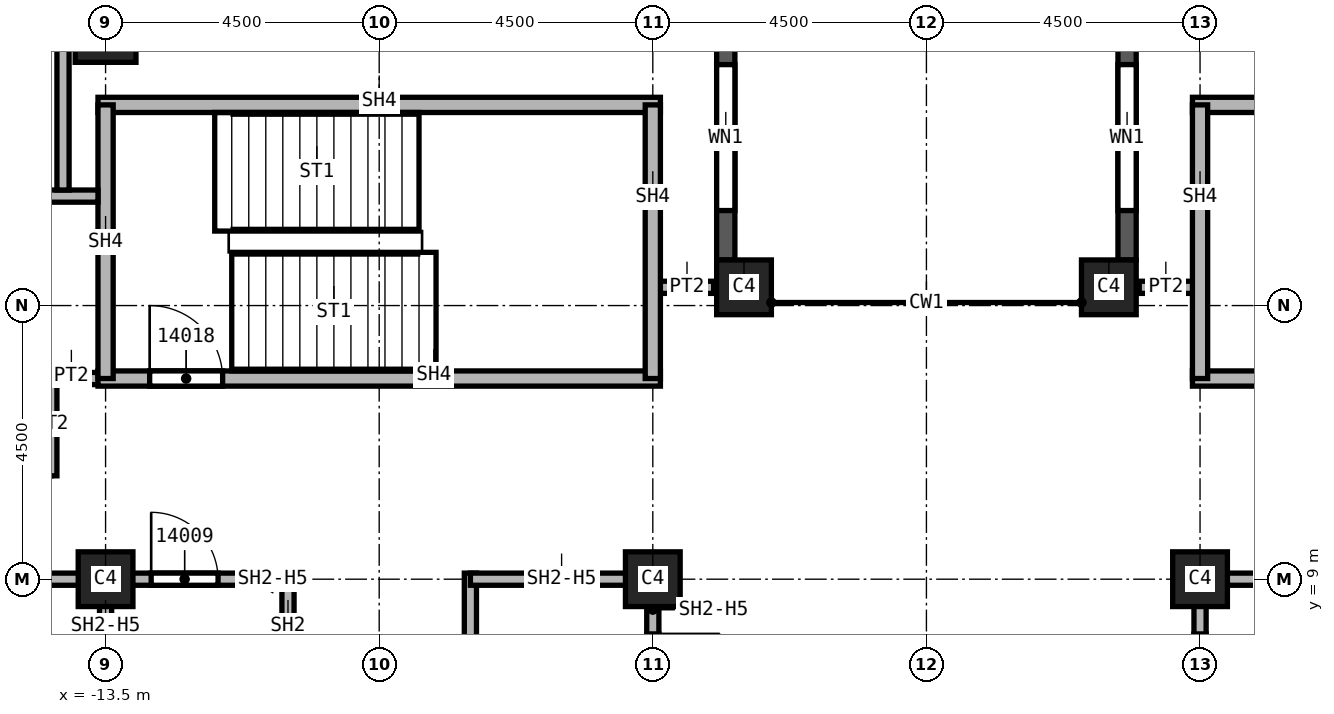
"""IFC4 building model, lengths in metres.
Left out: names, types, materials, properties, quantities, classifications, styles, units other than length and angle.
Written with IfcOpenShell. Run it as: python <this file> out.ifc"""

import sys

from ifc_helpers import new_model, si_unit, direction, frame, frame_2d, origin, origin_2d, place, context, subcontext, project, spatial, rectangle, extrude, element, fill, save


model = new_model("IFC4")
c1 = context("Model", 3, precision=1e-05, world=origin(), true_north=direction((0.0, 1.0)))
c2 = subcontext(c1, "Body", "Model", "MODEL_VIEW")
j1 = project(units=[si_unit("LENGTHUNIT", "METRE"), si_unit("PLANEANGLEUNIT", "RADIAN")], contexts=[c1])
p1 = place(None, origin())
s1 = spatial("IfcSite", under=j1, at=p1, CompositionType="ELEMENT")
p2 = place(p1, origin())
s2 = spatial("IfcBuilding", under=s1, at=p2, CompositionType="ELEMENT")
p3 = place(p2, frame((0.0, 0.0, 224.0)))
s3 = spatial("IfcBuildingStorey", under=s2, at=p3, CompositionType="ELEMENT", Elevation=224.0)
p4 = place(p3, frame((-13.5, 18.0, 0.0), z_axis=(0.0, 0.0, 1.0), x_axis=(1.0, 0.0, 0.0)))
e1 = element("IfcColumn", 1, at=p4, inside=s3, PredefinedType="COLUMN", context=c2, shape_type="SweptSolid", body=[
    extrude(rectangle(XDim=1.0, YDim=1.0, at=origin_2d()), origin(), (0.0, 0.0, 1.0), 3.72),
])
for number, where, z_axis, x_axis in (
    (2, (4.5, 9.0, 0.0), (0.0, 0.0, 1.0), (1.0, 0.0, 0.0)),
    (3, (-4.5, 9.0, 0.0), (0.0, 0.0, 1.0), (1.0, 0.0, 0.0)),
    (4, (-13.5, 9.0, 0.0), (0.0, 0.0, 1.0), (1.0, 0.0, 0.0)),
    (5, (3.0, 13.8, 0.0), (0.0, 0.0, 1.0), (1.0, 0.0, 0.0)),
    (6, (-3.0, 13.8, 0.0), (0.0, 0.0, 1.0), (1.0, 0.0, 0.0)),
):
    element("IfcColumn", number, at=place(p3, frame(where, z_axis=z_axis, x_axis=x_axis)), inside=s3, PredefinedType="COLUMN", context=c2, shape_type="SweptSolid", body=[
        extrude(rectangle(XDim=0.9, YDim=0.9, at=origin_2d()), origin(), (0.0, 0.0, 1.0), 3.72),
    ])
p5 = place(p3, frame((3.3, 22.3, 0.0), z_axis=(0.0, 0.0, 1.0), x_axis=(0.0, -1.0, 0.0)))
e7 = element("IfcWall", 7, at=p5, inside=s3, PredefinedType="SOLIDWALL", context=c2, shape_type="SweptSolid", body=[
    extrude(rectangle(XDim=8.05, YDim=0.3, at=frame_2d((4.025, 0.0))), origin(), (0.0, 0.0, 1.0), 3.12),
])
p6 = place(p5, frame((0.812, 0.0, 0.8)))
e8 = element("IfcOpeningElement", 8, at=p6, cuts=e7, PredefinedType="OPENING", context=c2, shape_type="SweptSolid", body=[
    extrude(rectangle(XDim=2.4, YDim=1.95, at=frame_2d((1.2, 0.975))), frame((0.0, 0.15, 0.0), z_axis=(0.0, -1.0, 0.0), x_axis=(1.0, 0.0, 0.0)), (0.0, 0.0, 1.0), 0.3),
])
p7 = place(p5, frame((4.837, 0.0, 0.8)))
e9 = element("IfcOpeningElement", 9, at=p7, cuts=e7, PredefinedType="OPENING", context=c2, shape_type="SweptSolid", body=[
    extrude(rectangle(XDim=2.4, YDim=1.95, at=frame_2d((1.2, 0.975))), frame((0.0, 0.15, 0.0), z_axis=(0.0, -1.0, 0.0), x_axis=(1.0, 0.0, 0.0)), (0.0, 0.0, 1.0), 0.3),
])
p8 = place(p3, frame((-3.3, 14.25, 0.0), z_axis=(0.0, 0.0, 1.0), x_axis=(0.0, 1.0, 0.0)))
e10 = element("IfcWall", 10, at=p8, inside=s3, PredefinedType="SOLIDWALL", context=c2, shape_type="SweptSolid", body=[
    extrude(rectangle(XDim=8.05, YDim=0.3, at=frame_2d((4.025, 0.0))), origin(), (0.0, 0.0, 1.0), 3.12),
])
p9 = place(p8, frame((0.812, 0.0, 0.8)))
e11 = element("IfcOpeningElement", 11, at=p9, cuts=e10, PredefinedType="OPENING", context=c2, shape_type="SweptSolid", body=[
    extrude(rectangle(XDim=2.4, YDim=1.95, at=frame_2d((1.2, 0.975))), frame((0.0, 0.15, 0.0), z_axis=(0.0, -1.0, 0.0), x_axis=(1.0, 0.0, 0.0)), (0.0, 0.0, 1.0), 0.3),
])
p10 = place(p8, frame((4.837, 0.0, 0.8)))
e12 = element("IfcOpeningElement", 12, at=p10, cuts=e10, PredefinedType="OPENING", context=c2, shape_type="SweptSolid", body=[
    extrude(rectangle(XDim=2.4, YDim=1.95, at=frame_2d((1.2, 0.975))), frame((0.0, 0.15, 0.0), z_axis=(0.0, -1.0, 0.0), x_axis=(1.0, 0.0, 0.0)), (0.0, 0.0, 1.0), 0.3),
])
p11 = place(p3, frame((-14.5, 12.3, 0.0), z_axis=(0.0, 0.0, 1.0), x_axis=(1.0, 0.0, 0.0)))
e13 = element("IfcWall", 13, at=p11, inside=s3, PredefinedType="PARTITIONING", context=c2, shape_type="SweptSolid", body=[
    extrude(rectangle(XDim=1.125, YDim=0.2, at=frame_2d((0.562, 0.0))), origin(), (0.0, 0.0, 1.0), 3.72),
])
p12 = place(p3, frame((-13.5, 9.0, 0.0), z_axis=(0.0, 0.0, 1.0), x_axis=(-1.0, 0.0, 0.0)))
e14 = element("IfcWall", 14, at=p12, inside=s3, PredefinedType="PARTITIONING", context=c2, shape_type="SweptSolid", body=[
    extrude(rectangle(XDim=4.5, YDim=0.2, at=frame_2d((2.25, 0.0))), origin(), (0.0, 0.0, 1.0), 3.72),
])
p13 = place(p3, frame((-14.4, 10.7, 0.0), z_axis=(0.0, 0.0, 1.0), x_axis=(0.0, 1.0, 0.0)))
e15 = element("IfcWall", 15, at=p13, inside=s3, PredefinedType="PARTITIONING", context=c2, shape_type="SweptSolid", body=[
    extrude(rectangle(XDim=1.6, YDim=0.2, at=frame_2d((0.8, 0.0))), origin(), (0.0, 0.0, 1.0), 3.72),
])
for number, where, z_axis, x_axis in (
    (16, (-4.5, 13.8, 0.0), (0.0, 0.0, 1.0), (1.0, 0.0, 0.0)),
    (17, (3.5, 13.8, 0.0), (0.0, 0.0, 1.0), (1.0, 0.0, 0.0)),
):
    element("IfcWall", number, at=place(p3, frame(where, z_axis=z_axis, x_axis=x_axis)), inside=s3, PredefinedType="PARTITIONING", context=c2, shape_type="SweptSolid", body=[
        extrude(rectangle(XDim=1.0, YDim=0.2, at=frame_2d((0.5, 0.0))), origin(), (0.0, 0.0, 1.0), 3.72),
    ])
p14 = place(p3, frame((-13.6, 9.0, 0.0), z_axis=(0.0, 0.0, 1.0), x_axis=(1.0, 0.0, 0.0)))
e18 = element("IfcWall", 18, at=p14, inside=s3, PredefinedType="SOLIDWALL", context=c2, shape_type="SweptSolid", body=[
    extrude(rectangle(XDim=3.1, YDim=0.2, at=frame_2d((1.55, 0.0))), origin(), (0.0, 0.0, 1.0), 2.958),
])
p15 = place(p14, frame((0.85, 0.0, 0.0)))
e19 = element("IfcOpeningElement", 19, at=p15, cuts=e18, PredefinedType="OPENING", context=c2, shape_type="SweptSolid", body=[
    extrude(rectangle(XDim=1.1, YDim=2.1, at=frame_2d((0.55, 1.05))), frame((0.0, 0.1, 0.0), z_axis=(0.0, -1.0, 0.0), x_axis=(1.0, 0.0, 0.0)), (0.0, 0.0, 1.0), 0.2),
])
p16 = place(p3, frame((-13.5, 7.5, 0.0), z_axis=(0.0, 0.0, 1.0), x_axis=(0.0, 1.0, 0.0)))
e20 = element("IfcWall", 20, at=p16, inside=s3, PredefinedType="SOLIDWALL", context=c2, shape_type="SweptSolid", body=[
    extrude(rectangle(XDim=1.6, YDim=0.2, at=frame_2d((0.8, 0.0))), origin(), (0.0, 0.0, 1.0), 2.958),
])
p17 = place(p3, frame((-10.5, 7.425, 0.0), z_axis=(0.0, 0.0, 1.0), x_axis=(0.0, 1.0, 0.0)))
e21 = element("IfcWall", 21, at=p17, inside=s3, PredefinedType="SOLIDWALL", context=c2, shape_type="SweptSolid", body=[
    extrude(rectangle(XDim=1.675, YDim=0.2, at=frame_2d((0.837, 0.0))), origin(), (0.0, 0.0, 1.0), 3.72),
])
p18 = place(p3, frame((-7.5, 6.0, 0.0), z_axis=(0.0, 0.0, 1.0), x_axis=(0.0, 1.0, 0.0)))
e22 = element("IfcWall", 22, at=p18, inside=s3, PredefinedType="SOLIDWALL", context=c2, shape_type="SweptSolid", body=[
    extrude(rectangle(XDim=3.1, YDim=0.2, at=frame_2d((1.55, 0.0))), origin(), (0.0, 0.0, 1.0), 3.72),
])
p19 = place(p3, frame((-7.5, 9.0, 0.0), z_axis=(0.0, 0.0, 1.0), x_axis=(1.0, 0.0, 0.0)))
e23 = element("IfcWall", 23, at=p19, inside=s3, PredefinedType="SOLIDWALL", context=c2, shape_type="SweptSolid", body=[
    extrude(rectangle(XDim=3.0, YDim=0.2, at=frame_2d((1.5, 0.0))), origin(), (0.0, 0.0, 1.0), 2.958),
])
p20 = place(p3, frame((-4.5, 9.1, 0.0), z_axis=(0.0, 0.0, 1.0), x_axis=(0.0, -1.0, 0.0)))
e24 = element("IfcWall", 24, at=p20, inside=s3, PredefinedType="SOLIDWALL", context=c2, shape_type="SweptSolid", body=[
    extrude(rectangle(XDim=3.1, YDim=0.2, at=frame_2d((1.55, 0.0))), origin(), (0.0, 0.0, 1.0), 2.958),
])
p21 = place(p20, frame((1.0, 0.0, 0.0)))
e25 = element("IfcOpeningElement", 25, at=p21, cuts=e24, PredefinedType="OPENING", context=c2, shape_type="SweptSolid", body=[
    extrude(rectangle(XDim=1.1, YDim=2.1, at=frame_2d((0.55, 1.05))), frame((0.0, 0.1, 0.0), z_axis=(0.0, -1.0, 0.0), x_axis=(1.0, 0.0, 0.0)), (0.0, 0.0, 1.0), 0.2),
])
p22 = place(p3, frame((4.5, 0.0, 0.0), z_axis=(0.0, 0.0, 1.0), x_axis=(0.0, 1.0, 0.0)))
e26 = element("IfcWall", 26, at=p22, inside=s3, PredefinedType="SOLIDWALL", context=c2, shape_type="SweptSolid", body=[
    extrude(rectangle(XDim=9.1, YDim=0.2, at=frame_2d((4.55, 0.0))), origin(), (0.0, 0.0, 1.0), 2.958),
])
p23 = place(p22, frame((3.4, 0.0, 0.0)))
e27 = element("IfcOpeningElement", 27, at=p23, cuts=e26, PredefinedType="OPENING", context=c2, shape_type="SweptSolid", body=[
    extrude(rectangle(XDim=1.1, YDim=2.1, at=frame_2d((0.55, 1.05))), frame((0.0, 0.1, 0.0), z_axis=(0.0, -1.0, 0.0), x_axis=(1.0, 0.0, 0.0)), (0.0, 0.0, 1.0), 0.2),
])
p24 = place(p22, frame((7.0, 0.0, 0.0)))
e28 = element("IfcOpeningElement", 28, at=p24, cuts=e26, PredefinedType="OPENING", context=c2, shape_type="SweptSolid", body=[
    extrude(rectangle(XDim=1.1, YDim=2.1, at=frame_2d((0.55, 1.05))), frame((0.0, 0.1, 0.0), z_axis=(0.0, -1.0, 0.0), x_axis=(1.0, 0.0, 0.0)), (0.0, 0.0, 1.0), 0.2),
])
p25 = place(p3, frame((4.5, 9.0, 0.0), z_axis=(0.0, 0.0, 1.0), x_axis=(1.0, 0.0, 0.0)))
e29 = element("IfcWall", 29, at=p25, inside=s3, PredefinedType="SOLIDWALL", context=c2, shape_type="SweptSolid", body=[
    extrude(rectangle(XDim=3.0, YDim=0.2, at=frame_2d((1.5, 0.0))), origin(), (0.0, 0.0, 1.0), 2.958),
])
p26 = place(p3, frame((-13.625, 12.3, 0.0), z_axis=(0.0, 0.0, 1.0), x_axis=(1.0, 0.0, 0.0)))
e30 = element("IfcWall", 30, at=p26, inside=s3, PredefinedType="SOLIDWALL", context=c2, shape_type="SweptSolid", body=[
    extrude(rectangle(XDim=9.25, YDim=0.25, at=frame_2d((4.625, 0.0))), origin(), (0.0, 0.0, 1.0), 3.72),
])
p27 = place(p26, frame((0.85, 0.0, 0.0)))
e31 = element("IfcOpeningElement", 31, at=p27, cuts=e30, PredefinedType="OPENING", context=c2, shape_type="SweptSolid", body=[
    extrude(rectangle(XDim=1.2, YDim=2.1, at=frame_2d((0.6, 1.05))), frame((0.0, 0.125, 0.0), z_axis=(0.0, -1.0, 0.0), x_axis=(1.0, 0.0, 0.0)), (0.0, 0.0, 1.0), 0.25),
])
p28 = place(p3, frame((-13.625, 16.8, 0.0), z_axis=(0.0, 0.0, 1.0), x_axis=(1.0, 0.0, 0.0)))
e32 = element("IfcWall", 32, at=p28, inside=s3, PredefinedType="SOLIDWALL", context=c2, shape_type="SweptSolid", body=[
    extrude(rectangle(XDim=9.25, YDim=0.25, at=frame_2d((4.625, 0.0))), origin(), (0.0, 0.0, 1.0), 3.72),
])
for number, where, z_axis, x_axis in (
    (33, (-13.5, 12.3, 0.0), (0.0, 0.0, 1.0), (0.0, 1.0, 0.0)),
    (34, (-4.5, 16.8, 0.0), (0.0, 0.0, 1.0), (0.0, -1.0, 0.0)),
):
    element("IfcWall", number, at=place(p3, frame(where, z_axis=z_axis, x_axis=x_axis)), inside=s3, PredefinedType="SOLIDWALL", context=c2, shape_type="SweptSolid", body=[
        extrude(rectangle(XDim=4.5, YDim=0.25, at=frame_2d((2.25, 0.0))), origin(), (0.0, 0.0, 1.0), 3.72),
    ])
p29 = place(p3, frame((4.375, 12.3, 0.0), z_axis=(0.0, 0.0, 1.0), x_axis=(1.0, 0.0, 0.0)))
e35 = element("IfcWall", 35, at=p29, inside=s3, PredefinedType="SOLIDWALL", context=c2, shape_type="SweptSolid", body=[
    extrude(rectangle(XDim=9.25, YDim=0.25, at=frame_2d((4.625, 0.0))), origin(), (0.0, 0.0, 1.0), 3.72),
])
p30 = place(p29, frame((7.2, 0.0, 0.0)))
e36 = element("IfcOpeningElement", 36, at=p30, cuts=e35, PredefinedType="OPENING", context=c2, shape_type="SweptSolid", body=[
    extrude(rectangle(XDim=1.2, YDim=2.1, at=frame_2d((0.6, 1.05))), frame((0.0, 0.125, 0.0), z_axis=(0.0, -1.0, 0.0), x_axis=(1.0, 0.0, 0.0)), (0.0, 0.0, 1.0), 0.25),
])
p31 = place(p3, frame((4.375, 16.8, 0.0), z_axis=(0.0, 0.0, 1.0), x_axis=(1.0, 0.0, 0.0)))
e37 = element("IfcWall", 37, at=p31, inside=s3, PredefinedType="SOLIDWALL", context=c2, shape_type="SweptSolid", body=[
    extrude(rectangle(XDim=9.25, YDim=0.25, at=frame_2d((4.625, 0.0))), origin(), (0.0, 0.0, 1.0), 3.72),
])
p32 = place(p3, frame((4.5, 12.3, 0.0), z_axis=(0.0, 0.0, 1.0), x_axis=(0.0, 1.0, 0.0)))
e38 = element("IfcWall", 38, at=p32, inside=s3, PredefinedType="SOLIDWALL", context=c2, shape_type="SweptSolid", body=[
    extrude(rectangle(XDim=4.5, YDim=0.25, at=frame_2d((2.25, 0.0))), origin(), (0.0, 0.0, 1.0), 3.72),
])
p33 = place(p3, frame((-21.9, 15.3, 0.0), z_axis=(0.0, 0.0, 1.0), x_axis=(1.0, 0.0, 0.0)))
e39 = element("IfcWall", 39, at=p33, inside=s3, PredefinedType="SOLIDWALL", context=c2, shape_type="SweptSolid", body=[
    extrude(rectangle(XDim=8.275, YDim=0.2, at=frame_2d((4.137, 0.0))), origin(), (0.0, 0.0, 1.0), 3.72),
])
p34 = place(p33, frame((4.8, 0.0, 0.0)))
e40 = element("IfcOpeningElement", 40, at=p34, cuts=e39, PredefinedType="OPENING", context=c2, shape_type="SweptSolid", body=[
    extrude(rectangle(XDim=1.2, YDim=2.1, at=frame_2d((0.6, 1.05))), frame((0.0, 0.1, 0.0), z_axis=(0.0, -1.0, 0.0), x_axis=(1.0, 0.0, 0.0)), (0.0, 0.0, 1.0), 0.2),
])
p35 = place(p3, frame((-14.2, 15.4, 0.0), z_axis=(0.0, 0.0, 1.0), x_axis=(0.0, 1.0, 0.0)))
e41 = element("IfcWall", 41, at=p35, inside=s3, PredefinedType="SOLIDWALL", context=c2, shape_type="SweptSolid", body=[
    extrude(rectangle(XDim=5.9, YDim=0.2, at=frame_2d((2.95, 0.0))), origin(), (0.0, 0.0, 1.0), 3.72),
])
p36 = place(p7, origin())
e42 = element("IfcWindow", 42, at=p36, inside=s3, PartitioningType="SINGLE_PANEL", PredefinedType="WINDOW", context=c2, shape_type="SweptSolid", body=[
    extrude(rectangle(XDim=2.4, YDim=1.95, at=frame_2d((1.2, 0.975))), frame((0.0, 0.03, 0.0), z_axis=(0.0, -1.0, 0.0), x_axis=(1.0, 0.0, 0.0)), (0.0, 0.0, 1.0), 0.06),
])
fill(e9, e42)
p37 = place(p9, origin())
e43 = element("IfcWindow", 43, at=p37, inside=s3, PartitioningType="SINGLE_PANEL", PredefinedType="WINDOW", context=c2, shape_type="SweptSolid", body=[
    extrude(rectangle(XDim=2.4, YDim=1.95, at=frame_2d((1.2, 0.975))), frame((0.0, 0.03, 0.0), z_axis=(0.0, -1.0, 0.0), x_axis=(1.0, 0.0, 0.0)), (0.0, 0.0, 1.0), 0.06),
])
fill(e11, e43)
p38 = place(p15, origin())
e44 = element("IfcDoor", 44, at=p38, inside=s3, OperationType="SINGLE_SWING_RIGHT", PredefinedType="DOOR", context=c2, shape_type="SweptSolid", body=[
    extrude(rectangle(XDim=1.1, YDim=2.1, at=frame_2d((0.55, 1.05))), frame((0.0, 0.025, 0.0), z_axis=(0.0, -1.0, 0.0), x_axis=(1.0, 0.0, 0.0)), (0.0, 0.0, 1.0), 0.05),
])
fill(e19, e44)
p39 = place(p27, origin())
e45 = element("IfcDoor", 45, at=p39, inside=s3, OperationType="SINGLE_SWING_LEFT", PredefinedType="DOOR", context=c2, shape_type="SweptSolid", body=[
    extrude(rectangle(XDim=1.2, YDim=2.1, at=frame_2d((0.6, 1.05))), frame((0.0, 0.025, 0.0), z_axis=(0.0, -1.0, 0.0), x_axis=(1.0, 0.0, 0.0)), (0.0, 0.0, 1.0), 0.05),
])
fill(e31, e45)
save(model, sys.argv[1])
